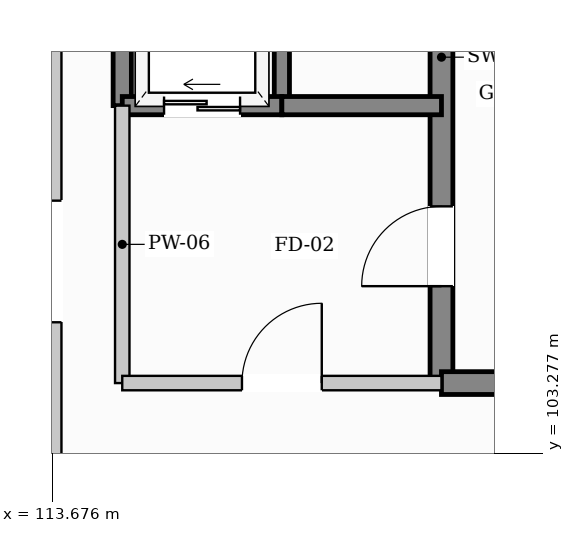
"""IFC4 building model, lengths in metres.
Left out: names, types, materials, properties, quantities, classifications, styles, units other than length and angle.
Written with IfcOpenShell. Run it as: python <this file> out.ifc"""

import sys

from ifc_helpers import new_model, si_unit, direction, frame, frame_2d, origin, place, context, subcontext, project, spatial, rectangle, extrude, element, fill, save


model = new_model("IFC4")
c1 = context("Model", 3, precision=1e-05, world=origin(), true_north=direction((0.0, 1.0)))
c2 = subcontext(c1, "Body", "Model", "MODEL_VIEW")
j1 = project(units=[si_unit("LENGTHUNIT", "METRE"), si_unit("PLANEANGLEUNIT", "RADIAN")], contexts=[c1])
p1 = place(None, origin())
s1 = spatial("IfcSite", under=j1, at=p1, CompositionType="ELEMENT")
p2 = place(p1, origin())
s2 = spatial("IfcBuilding", under=s1, at=p2, CompositionType="ELEMENT")
p3 = place(p2, frame((0.0, 0.0, 20.4)))
s3 = spatial("IfcBuildingStorey", under=s2, at=p3, CompositionType="ELEMENT", Elevation=20.4)
p4 = place(p3, frame((113.6, 102.2, 0.0), z_axis=(0.0, 0.0, 1.0), x_axis=(0.0, 1.0, 0.0)))
e1 = element("IfcWall", 1, at=p4, inside=s3, PredefinedType="SOLIDWALL", context=c2, shape_type="SweptSolid", body=[
    extrude(rectangle(XDim=7.2, YDim=0.4, at=frame_2d((3.6, 0.0))), origin(), (0.0, 0.0, 1.0), 2.62),
])
p5 = place(p4, frame((2.8, 0.0, 0.0)))
e2 = element("IfcOpeningElement", 2, at=p5, cuts=e1, PredefinedType="OPENING", context=c2, shape_type="SweptSolid", body=[
    extrude(rectangle(XDim=1.6, YDim=2.25, at=frame_2d((0.8, 1.125))), frame((0.0, 0.21, 0.0), z_axis=(0.0, -1.0, 0.0), x_axis=(1.0, 0.0, 0.0)), (0.0, 0.0, 1.0), 0.42),
])
p6 = place(p3, frame((118.8, 104.2, 0.0), z_axis=(0.0, 0.0, 1.0), x_axis=(0.0, 1.0, 0.0)))
e3 = element("IfcWall", 3, at=p6, inside=s3, PredefinedType="SHEAR", context=c2, shape_type="SweptSolid", body=[
    extrude(rectangle(XDim=6.0, YDim=0.3, at=frame_2d((3.0, 0.0))), origin(), (0.0, 0.0, 1.0), 3.34),
])
p7 = place(p6, frame((1.275, 0.0, 0.0)))
e4 = element("IfcOpeningElement", 4, at=p7, cuts=e3, PredefinedType="OPENING", context=c2, shape_type="SweptSolid", body=[
    extrude(rectangle(XDim=1.05, YDim=2.15, at=frame_2d((0.525, 1.075))), frame((0.0, 0.16, 0.0), z_axis=(0.0, -1.0, 0.0), x_axis=(1.0, 0.0, 0.0)), (0.0, 0.0, 1.0), 0.32),
])
p8 = place(p3, frame((118.8, 104.2, 0.0), z_axis=(0.0, 0.0, 1.0), x_axis=(1.0, 0.0, 0.0)))
e5 = element("IfcWall", 5, at=p8, inside=s3, PredefinedType="SHEAR", context=c2, shape_type="SweptSolid", body=[
    extrude(rectangle(XDim=7.0, YDim=0.3, at=frame_2d((3.5, 0.0))), origin(), (0.0, 0.0, 1.0), 3.34),
])
p9 = place(p3, frame((114.6, 107.85, 0.0), z_axis=(0.0, 0.0, 1.0), x_axis=(0.0, 1.0, 0.0)))
e6 = element("IfcWall", 6, at=p9, inside=s3, PredefinedType="SHEAR", context=c2, shape_type="SweptSolid", body=[
    extrude(rectangle(XDim=2.35, YDim=0.24, at=frame_2d((1.175, 0.0))), origin(), (0.0, 0.0, 1.0), 3.34),
])
p10 = place(p3, frame((116.7, 107.85, 0.0), z_axis=(0.0, 0.0, 1.0), x_axis=(0.0, 1.0, 0.0)))
e7 = element("IfcWall", 7, at=p10, inside=s3, PredefinedType="SHEAR", context=c2, shape_type="SweptSolid", body=[
    extrude(rectangle(XDim=2.35, YDim=0.2, at=frame_2d((1.175, 0.0))), origin(), (0.0, 0.0, 1.0), 3.34),
])
p11 = place(p3, frame((114.6, 107.85, 0.0), z_axis=(0.0, 0.0, 1.0), x_axis=(1.0, 0.0, 0.0)))
e8 = element("IfcWall", 8, at=p11, inside=s3, PredefinedType="SHEAR", context=c2, shape_type="SweptSolid", body=[
    extrude(rectangle(XDim=2.1, YDim=0.24, at=frame_2d((1.05, 0.0))), origin(), (0.0, 0.0, 1.0), 3.34),
])
p12 = place(p11, frame((0.55, 0.0, 0.0)))
e9 = element("IfcOpeningElement", 9, at=p12, cuts=e8, PredefinedType="OPENING", context=c2, shape_type="SweptSolid", body=[
    extrude(rectangle(XDim=1.0, YDim=2.1, at=frame_2d((0.5, 1.05))), frame((0.0, 0.13, 0.0), z_axis=(0.0, -1.0, 0.0), x_axis=(1.0, 0.0, 0.0)), (0.0, 0.0, 1.0), 0.26),
])
p13 = place(p3, frame((116.7, 107.85, 0.0), z_axis=(0.0, 0.0, 1.0), x_axis=(1.0, 0.0, 0.0)))
e10 = element("IfcWall", 10, at=p13, inside=s3, PredefinedType="SHEAR", context=c2, shape_type="SweptSolid", body=[
    extrude(rectangle(XDim=2.1, YDim=0.24, at=frame_2d((1.05, 0.0))), origin(), (0.0, 0.0, 1.0), 3.34),
])
p14 = place(p3, frame((114.6, 104.2, 0.0), z_axis=(0.0, 0.0, 1.0), x_axis=(0.0, 1.0, 0.0)))
e11 = element("IfcWall", 11, at=p14, inside=s3, PredefinedType="PARTITIONING", context=c2, shape_type="SweptSolid", body=[
    extrude(rectangle(XDim=3.65, YDim=0.19, at=frame_2d((1.825, 0.0))), origin(), (0.0, 0.0, 1.0), 3.34),
])
p15 = place(p3, frame((114.6, 104.2, 0.0), z_axis=(0.0, 0.0, 1.0), x_axis=(1.0, 0.0, 0.0)))
e12 = element("IfcWall", 12, at=p15, inside=s3, PredefinedType="PARTITIONING", context=c2, shape_type="SweptSolid", body=[
    extrude(rectangle(XDim=4.2, YDim=0.19, at=frame_2d((2.1, 0.0))), origin(), (0.0, 0.0, 1.0), 3.34),
])
p16 = place(p15, frame((1.575, 0.0, 0.0)))
e13 = element("IfcOpeningElement", 13, at=p16, cuts=e12, PredefinedType="OPENING", context=c2, shape_type="SweptSolid", body=[
    extrude(rectangle(XDim=1.05, YDim=2.15, at=frame_2d((0.525, 1.075))), frame((0.0, 0.105, 0.0), z_axis=(0.0, -1.0, 0.0), x_axis=(1.0, 0.0, 0.0)), (0.0, 0.0, 1.0), 0.21),
])
p17 = place(p7, origin())
e14 = element("IfcDoor", 14, at=p17, inside=s3, OperationType="SINGLE_SWING_LEFT", PredefinedType="DOOR", context=c2, shape_type="SweptSolid", body=[
    extrude(rectangle(XDim=1.05, YDim=2.15, at=frame_2d((0.525, 1.075))), frame((0.0, 0.025, 0.0), z_axis=(0.0, -1.0, 0.0), x_axis=(1.0, 0.0, 0.0)), (0.0, 0.0, 1.0), 0.05),
])
fill(e4, e14)
p18 = place(p12, origin())
e15 = element("IfcDoor", 15, at=p18, inside=s3, OperationType="SLIDING_TO_LEFT", PredefinedType="DOOR", context=c2, shape_type="SweptSolid", body=[
    extrude(rectangle(XDim=1.0, YDim=2.1, at=frame_2d((0.5, 1.05))), frame((0.0, 0.025, 0.0), z_axis=(0.0, -1.0, 0.0), x_axis=(1.0, 0.0, 0.0)), (0.0, 0.0, 1.0), 0.05),
])
fill(e9, e15)
p19 = place(p16, origin())
e16 = element("IfcDoor", 16, at=p19, inside=s3, OperationType="SINGLE_SWING_RIGHT", PredefinedType="DOOR", context=c2, shape_type="SweptSolid", body=[
    extrude(rectangle(XDim=1.05, YDim=2.15, at=frame_2d((0.525, 1.075))), frame((0.0, 0.025, 0.0), z_axis=(0.0, -1.0, 0.0), x_axis=(1.0, 0.0, 0.0)), (0.0, 0.0, 1.0), 0.05),
])
fill(e13, e16)
save(model, sys.argv[1])
